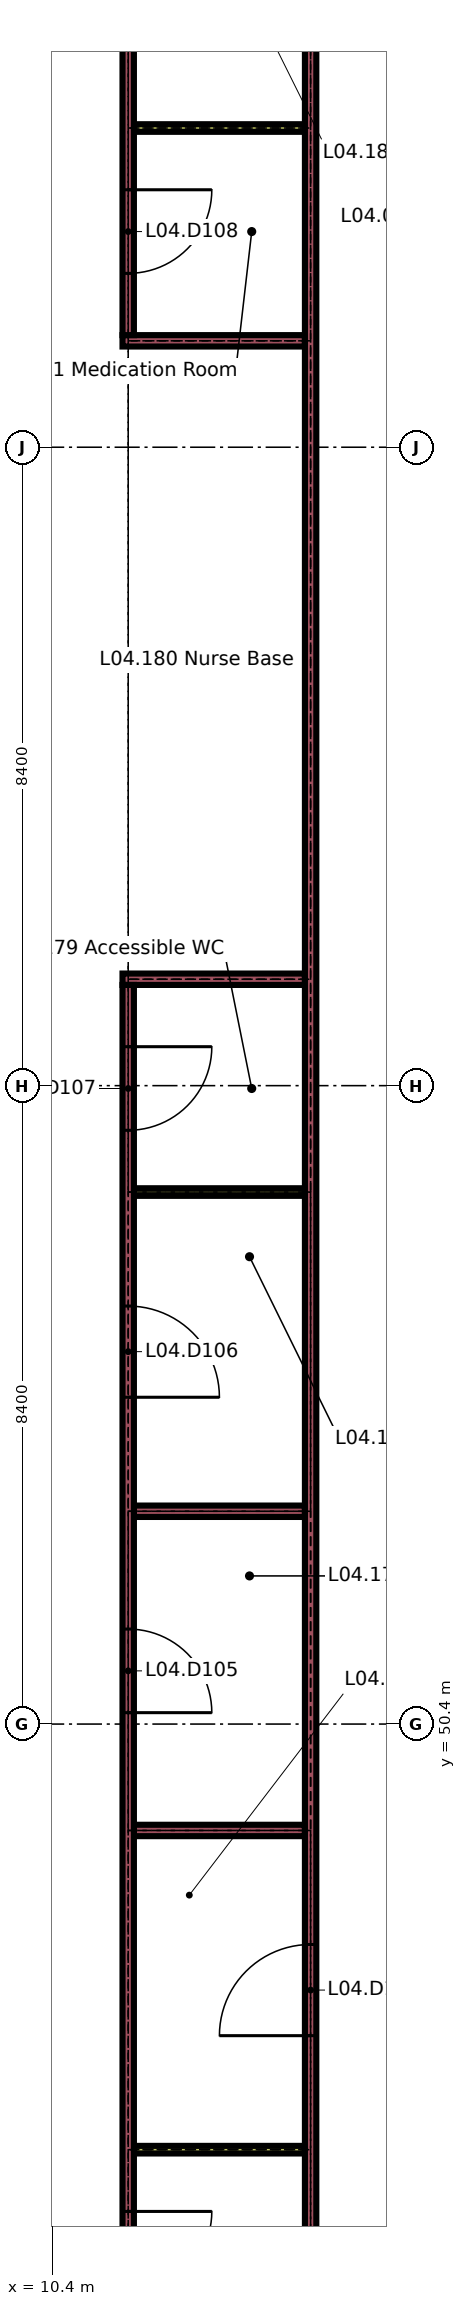
"""IFC4 building model, lengths in metres.
Left out: names, types, materials, properties, quantities, classifications, styles, units other than length and angle.
Written with IfcOpenShell. Run it as: python <this file> out.ifc"""

import sys

from ifc_helpers import new_model, si_unit, direction, frame, frame_2d, origin, place, context, subcontext, project, spatial, rectangle, extrude, element, fill, save


model = new_model("IFC4")
c1 = context("Model", 3, precision=1e-05, world=origin(), true_north=direction((0.0, 1.0)))
c2 = subcontext(c1, "Body", "Model", "MODEL_VIEW")
j1 = project(units=[si_unit("LENGTHUNIT", "METRE"), si_unit("PLANEANGLEUNIT", "RADIAN")], contexts=[c1])
p1 = place(None, origin())
s1 = spatial("IfcSite", under=j1, at=p1, CompositionType="ELEMENT")
p2 = place(p1, origin())
s2 = spatial("IfcBuilding", under=s1, at=p2, CompositionType="ELEMENT")
p3 = place(p2, frame((0.0, 0.0, 18.9)))
s3 = spatial("IfcBuildingStorey", under=s2, at=p3, CompositionType="ELEMENT", Elevation=18.9)
p4 = place(p3, frame((11.475, 44.8, 0.0), z_axis=(0.0, 0.0, 1.0), x_axis=(1.0, 0.0, 0.0)))
e1 = element("IfcWall", 1, at=p4, inside=s3, PredefinedType="PARTITIONING", context=c2, shape_type="SweptSolid", body=[
    extrude(rectangle(XDim=2.25, YDim=0.1, at=frame_2d((1.125, 0.0))), origin(), (0.0, 0.0, 1.0), 3.26),
])
for number, where, z_axis, x_axis in (
    (2, (11.475, 49.0, 0.0), (0.0, 0.0, 1.0), (1.0, 0.0, 0.0)),
    (3, (11.475, 53.2, 0.0), (0.0, 0.0, 1.0), (1.0, 0.0, 0.0)),
):
    element("IfcWall", number, at=place(p3, frame(where, z_axis=z_axis, x_axis=x_axis)), inside=s3, PredefinedType="PARTITIONING", context=c2, shape_type="SweptSolid", body=[
        extrude(rectangle(XDim=2.25, YDim=0.15, at=frame_2d((1.125, 0.0))), origin(), (0.0, 0.0, 1.0), 3.26),
    ])
p5 = place(p3, frame((11.475, 57.4, 0.0), z_axis=(0.0, 0.0, 1.0), x_axis=(1.0, 0.0, 0.0)))
e4 = element("IfcWall", 4, at=p5, inside=s3, PredefinedType="PARTITIONING", context=c2, shape_type="SweptSolid", body=[
    extrude(rectangle(XDim=2.25, YDim=0.1, at=frame_2d((1.125, 0.0))), origin(), (0.0, 0.0, 1.0), 3.26),
])
for number, where, z_axis, x_axis in (
    (5, (11.325, 60.2, 0.0), (0.0, 0.0, 1.0), (1.0, 0.0, 0.0)),
    (6, (11.325, 68.6, 0.0), (0.0, 0.0, 1.0), (1.0, 0.0, 0.0)),
):
    element("IfcWall", number, at=place(p3, frame(where, z_axis=z_axis, x_axis=x_axis)), inside=s3, PredefinedType="PARTITIONING", context=c2, shape_type="SweptSolid", body=[
        extrude(rectangle(XDim=2.4, YDim=0.15, at=frame_2d((1.2, 0.0))), origin(), (0.0, 0.0, 1.0), 3.26),
    ])
p6 = place(p3, frame((11.475, 71.4, 0.0), z_axis=(0.0, 0.0, 1.0), x_axis=(1.0, 0.0, 0.0)))
e7 = element("IfcWall", 7, at=p6, inside=s3, PredefinedType="PARTITIONING", context=c2, shape_type="SweptSolid", body=[
    extrude(rectangle(XDim=2.25, YDim=0.1, at=frame_2d((1.125, 0.0))), origin(), (0.0, 0.0, 1.0), 3.26),
])
p7 = place(p3, frame((11.4, 42.075, 0.0), z_axis=(0.0, 0.0, 1.0), x_axis=(0.0, 1.0, 0.0)))
e8 = element("IfcWall", 8, at=p7, inside=s3, PredefinedType="PARTITIONING", context=c2, shape_type="SweptSolid", body=[
    extrude(rectangle(XDim=18.05, YDim=0.15, at=frame_2d((9.025, 0.0))), origin(), (0.0, 0.0, 1.0), 3.26),
])
p8 = place(p7, frame((0.812, 0.0, 0.0)))
e9 = element("IfcOpeningElement", 9, at=p8, cuts=e8, PredefinedType="OPENING", context=c2, shape_type="SweptSolid", body=[
    extrude(rectangle(XDim=1.1, YDim=2.1, at=frame_2d((0.55, 1.05))), frame((0.0, 0.085, 0.0), z_axis=(0.0, -1.0, 0.0), x_axis=(1.0, 0.0, 0.0)), (0.0, 0.0, 1.0), 0.17),
])
p9 = place(p7, frame((8.475, 0.0, 0.0)))
e10 = element("IfcOpeningElement", 10, at=p9, cuts=e8, PredefinedType="OPENING", context=c2, shape_type="SweptSolid", body=[
    extrude(rectangle(XDim=1.1, YDim=2.1, at=frame_2d((0.55, 1.05))), frame((0.0, 0.085, 0.0), z_axis=(0.0, -1.0, 0.0), x_axis=(1.0, 0.0, 0.0)), (0.0, 0.0, 1.0), 0.17),
])
p10 = place(p7, frame((12.625, 0.0, 0.0)))
e11 = element("IfcOpeningElement", 11, at=p10, cuts=e8, PredefinedType="OPENING", context=c2, shape_type="SweptSolid", body=[
    extrude(rectangle(XDim=1.2, YDim=2.1, at=frame_2d((0.6, 1.05))), frame((0.0, 0.085, 0.0), z_axis=(0.0, -1.0, 0.0), x_axis=(1.0, 0.0, 0.0)), (0.0, 0.0, 1.0), 0.17),
])
p11 = place(p7, frame((16.137, 0.0, 0.0)))
e12 = element("IfcOpeningElement", 12, at=p11, cuts=e8, PredefinedType="OPENING", context=c2, shape_type="SweptSolid", body=[
    extrude(rectangle(XDim=1.1, YDim=2.1, at=frame_2d((0.55, 1.05))), frame((0.0, 0.085, 0.0), z_axis=(0.0, -1.0, 0.0), x_axis=(1.0, 0.0, 0.0)), (0.0, 0.0, 1.0), 0.17),
])
p12 = place(p3, frame((11.4, 68.675, 0.0), z_axis=(0.0, 0.0, 1.0), x_axis=(0.0, 1.0, 0.0)))
e13 = element("IfcWall", 13, at=p12, inside=s3, PredefinedType="PARTITIONING", context=c2, shape_type="SweptSolid", body=[
    extrude(rectangle(XDim=18.05, YDim=0.15, at=frame_2d((9.025, 0.0))), origin(), (0.0, 0.0, 1.0), 3.26),
])
p13 = place(p12, frame((0.812, 0.0, 0.0)))
e14 = element("IfcOpeningElement", 14, at=p13, cuts=e13, PredefinedType="OPENING", context=c2, shape_type="SweptSolid", body=[
    extrude(rectangle(XDim=1.1, YDim=2.1, at=frame_2d((0.55, 1.05))), frame((0.0, 0.085, 0.0), z_axis=(0.0, -1.0, 0.0), x_axis=(1.0, 0.0, 0.0)), (0.0, 0.0, 1.0), 0.17),
])
p14 = place(p12, frame((8.475, 0.0, 0.0)))
e15 = element("IfcOpeningElement", 15, at=p14, cuts=e13, PredefinedType="OPENING", context=c2, shape_type="SweptSolid", body=[
    extrude(rectangle(XDim=1.1, YDim=2.1, at=frame_2d((0.55, 1.05))), frame((0.0, 0.085, 0.0), z_axis=(0.0, -1.0, 0.0), x_axis=(1.0, 0.0, 0.0)), (0.0, 0.0, 1.0), 0.17),
])
p15 = place(p12, frame((12.625, 0.0, 0.0)))
e16 = element("IfcOpeningElement", 16, at=p15, cuts=e13, PredefinedType="OPENING", context=c2, shape_type="SweptSolid", body=[
    extrude(rectangle(XDim=1.2, YDim=2.1, at=frame_2d((0.6, 1.05))), frame((0.0, 0.085, 0.0), z_axis=(0.0, -1.0, 0.0), x_axis=(1.0, 0.0, 0.0)), (0.0, 0.0, 1.0), 0.17),
])
p16 = place(p12, frame((16.137, 0.0, 0.0)))
e17 = element("IfcOpeningElement", 17, at=p16, cuts=e13, PredefinedType="OPENING", context=c2, shape_type="SweptSolid", body=[
    extrude(rectangle(XDim=1.1, YDim=2.1, at=frame_2d((0.55, 1.05))), frame((0.0, 0.085, 0.0), z_axis=(0.0, -1.0, 0.0), x_axis=(1.0, 0.0, 0.0)), (0.0, 0.0, 1.0), 0.17),
])
p17 = place(p3, frame((13.8, 33.7, 0.0), z_axis=(0.0, 0.0, 1.0), x_axis=(0.0, 1.0, 0.0)))
e18 = element("IfcWall", 18, at=p17, inside=s3, PredefinedType="PARTITIONING", context=c2, shape_type="SweptSolid", body=[
    extrude(rectangle(XDim=58.6, YDim=0.15, at=frame_2d((29.3, 0.0))), origin(), (0.0, 0.0, 1.0), 3.26),
])
p18 = place(p17, frame((12.6, 0.0, 0.0)))
e19 = element("IfcOpeningElement", 19, at=p18, cuts=e18, PredefinedType="OPENING", context=c2, shape_type="SweptSolid", body=[
    extrude(rectangle(XDim=1.2, YDim=2.1, at=frame_2d((0.6, 1.05))), frame((0.0, 0.085, 0.0), z_axis=(0.0, -1.0, 0.0), x_axis=(1.0, 0.0, 0.0)), (0.0, 0.0, 1.0), 0.17),
])
p19 = place(p17, frame((39.2, 0.0, 0.0)))
e20 = element("IfcOpeningElement", 20, at=p19, cuts=e18, PredefinedType="OPENING", context=c2, shape_type="SweptSolid", body=[
    extrude(rectangle(XDim=1.2, YDim=2.1, at=frame_2d((0.6, 1.05))), frame((0.0, 0.085, 0.0), z_axis=(0.0, -1.0, 0.0), x_axis=(1.0, 0.0, 0.0)), (0.0, 0.0, 1.0), 0.17),
])
p20 = place(p8, origin())
e21 = element("IfcDoor", 21, at=p20, inside=s3, OperationType="SINGLE_SWING_RIGHT", PredefinedType="DOOR", context=c2, shape_type="SweptSolid", body=[
    extrude(rectangle(XDim=1.1, YDim=2.1, at=frame_2d((0.55, 1.05))), frame((0.0, 0.025, 0.0), z_axis=(0.0, -1.0, 0.0), x_axis=(1.0, 0.0, 0.0)), (0.0, 0.0, 1.0), 0.05),
])
fill(e9, e21)
p21 = place(p9, origin())
e22 = element("IfcDoor", 22, at=p21, inside=s3, OperationType="SINGLE_SWING_LEFT", PredefinedType="DOOR", context=c2, shape_type="SweptSolid", body=[
    extrude(rectangle(XDim=1.1, YDim=2.1, at=frame_2d((0.55, 1.05))), frame((0.0, 0.025, 0.0), z_axis=(0.0, -1.0, 0.0), x_axis=(1.0, 0.0, 0.0)), (0.0, 0.0, 1.0), 0.05),
])
fill(e10, e22)
p22 = place(p10, origin())
e23 = element("IfcDoor", 23, at=p22, inside=s3, OperationType="SINGLE_SWING_LEFT", PredefinedType="DOOR", context=c2, shape_type="SweptSolid", body=[
    extrude(rectangle(XDim=1.2, YDim=2.1, at=frame_2d((0.6, 1.05))), frame((0.0, 0.025, 0.0), z_axis=(0.0, -1.0, 0.0), x_axis=(1.0, 0.0, 0.0)), (0.0, 0.0, 1.0), 0.05),
])
fill(e11, e23)
p23 = place(p11, origin())
e24 = element("IfcDoor", 24, at=p23, inside=s3, OperationType="SINGLE_SWING_RIGHT", PredefinedType="DOOR", context=c2, shape_type="SweptSolid", body=[
    extrude(rectangle(XDim=1.1, YDim=2.1, at=frame_2d((0.55, 1.05))), frame((0.0, 0.025, 0.0), z_axis=(0.0, -1.0, 0.0), x_axis=(1.0, 0.0, 0.0)), (0.0, 0.0, 1.0), 0.05),
])
fill(e12, e24)
p24 = place(p13, origin())
e25 = element("IfcDoor", 25, at=p24, inside=s3, OperationType="SINGLE_SWING_RIGHT", PredefinedType="DOOR", context=c2, shape_type="SweptSolid", body=[
    extrude(rectangle(XDim=1.1, YDim=2.1, at=frame_2d((0.55, 1.05))), frame((0.0, 0.025, 0.0), z_axis=(0.0, -1.0, 0.0), x_axis=(1.0, 0.0, 0.0)), (0.0, 0.0, 1.0), 0.05),
])
fill(e14, e25)
p25 = place(p18, origin())
e26 = element("IfcDoor", 26, at=p25, inside=s3, OperationType="SINGLE_SWING_RIGHT", PredefinedType="DOOR", context=c2, shape_type="SweptSolid", body=[
    extrude(rectangle(XDim=1.2, YDim=2.1, at=frame_2d((0.6, 1.05))), frame((0.0, 0.025, 0.0), z_axis=(0.0, -1.0, 0.0), x_axis=(1.0, 0.0, 0.0)), (0.0, 0.0, 1.0), 0.05),
])
fill(e19, e26)
save(model, sys.argv[1])
